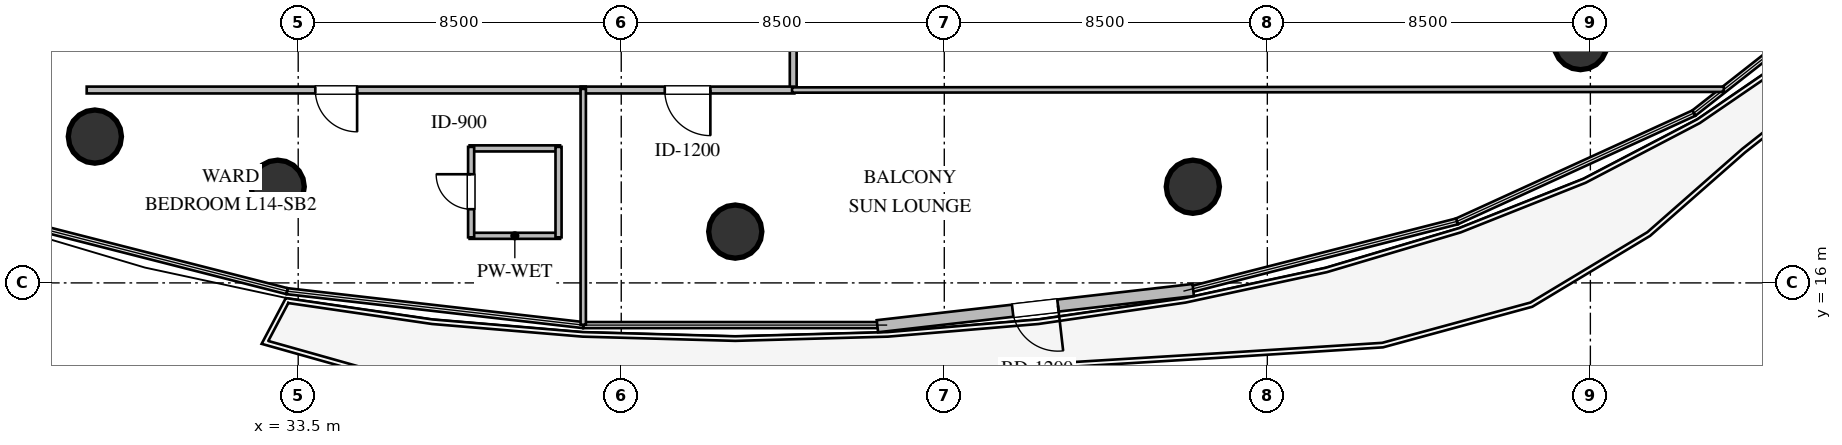
"""IFC4 building model, lengths in metres.
Left out: names, types, materials, properties, quantities, classifications, styles, units other than length and angle.
Written with IfcOpenShell. Run it as: python <this file> out.ifc"""

import sys

from ifc_helpers import new_model, si_unit, direction, frame, frame_2d, origin, origin_2d, place, context, subcontext, project, spatial, rectangle, circle, extrude, element, fill, save


model = new_model("IFC4")
c1 = context("Model", 3, precision=1e-05, world=origin(), true_north=direction((0.0, 1.0)))
c2 = subcontext(c1, "Body", "Model", "MODEL_VIEW")
j1 = project(units=[si_unit("LENGTHUNIT", "METRE"), si_unit("PLANEANGLEUNIT", "RADIAN")], contexts=[c1])
p1 = place(None, origin())
s1 = spatial("IfcSite", under=j1, at=p1, CompositionType="ELEMENT")
p2 = place(p1, origin())
s2 = spatial("IfcBuilding", under=s1, at=p2, CompositionType="ELEMENT")
p3 = place(p2, frame((0.0, 0.0, 56.4)))
s3 = spatial("IfcBuildingStorey", under=s2, at=p3, CompositionType="ELEMENT", Elevation=56.4)
for number, where, z_axis, x_axis in (
    (1, (28.15, 19.85, 0.0), (0.0, 0.0, 1.0), (1.0, 0.0, 0.0)),
    (2, (32.96, 18.53, 0.0), (0.0, 0.0, 1.0), (1.0, 0.0, 0.0)),
    (3, (45.0, 17.35, 0.0), (0.0, 0.0, 1.0), (1.0, 0.0, 0.0)),
    (4, (57.04, 18.53, 0.0), (0.0, 0.0, 1.0), (1.0, 0.0, 0.0)),
    (5, (67.24, 22.31, 0.0), (0.0, 0.0, 1.0), (1.0, 0.0, 0.0)),
):
    element("IfcColumn", number, at=place(p3, frame(where, z_axis=z_axis, x_axis=x_axis)), inside=s3, PredefinedType="COLUMN", context=c2, shape_type="SweptSolid", body=[
        extrude(circle(Radius=0.7, at=origin_2d()), origin(), (0.0, 0.0, 1.0), 3.6),
    ])
p4 = place(p3, frame((57.05, 15.812, 0.0), z_axis=(0.0, 0.0, 1.0), x_axis=(-0.993503192468, -0.113804246649, 0.0)))
e6 = element("IfcWall", 6, at=p4, inside=s3, PredefinedType="STANDARD", context=c2, shape_type="SweptSolid", body=[
    extrude(rectangle(XDim=8.365, YDim=0.32, at=frame_2d((4.182, 0.0))), origin(), (0.0, 0.0, 1.0), 3.36),
])
p5 = place(p4, frame((3.582, 0.0, 0.0)))
e7 = element("IfcOpeningElement", 7, at=p5, cuts=e6, PredefinedType="OPENING", context=c2, shape_type="SweptSolid", body=[
    extrude(rectangle(XDim=1.2, YDim=2.15, at=frame_2d((0.6, 1.075))), frame((0.0, 0.17, 0.0), z_axis=(0.0, -1.0, 0.0), x_axis=(1.0, 0.0, 0.0)), (0.0, 0.0, 1.0), 0.34),
])
p6 = place(p3, frame((38.01, 17.239, 0.0), z_axis=(0.0, 0.0, 1.0), x_axis=(1.0, 0.0, 0.0)))
e8 = element("IfcWall", 8, at=p6, inside=s3, PredefinedType="PLUMBINGWALL", context=c2, shape_type="SweptSolid", body=[
    extrude(rectangle(XDim=2.38, YDim=0.16, at=frame_2d((1.19, 0.0))), origin(), (0.0, 0.0, 1.0), 2.738),
])
p7 = place(p3, frame((38.01, 19.539, 0.0), z_axis=(0.0, 0.0, 1.0), x_axis=(1.0, 0.0, 0.0)))
e9 = element("IfcWall", 9, at=p7, inside=s3, PredefinedType="PLUMBINGWALL", context=c2, shape_type="SweptSolid", body=[
    extrude(rectangle(XDim=2.38, YDim=0.16, at=frame_2d((1.19, 0.0))), origin(), (0.0, 0.0, 1.0), 3.36),
])
p8 = place(p3, frame((38.05, 17.199, 0.0), z_axis=(0.0, 0.0, 1.0), x_axis=(0.0, 1.0, 0.0)))
e10 = element("IfcWall", 10, at=p8, inside=s3, PredefinedType="PLUMBINGWALL", context=c2, shape_type="SweptSolid", body=[
    extrude(rectangle(XDim=2.38, YDim=0.16, at=frame_2d((1.19, 0.0))), origin(), (0.0, 0.0, 1.0), 3.36),
])
p9 = place(p8, frame((0.74, 0.0, 0.0)))
e11 = element("IfcOpeningElement", 11, at=p9, cuts=e10, PredefinedType="OPENING", context=c2, shape_type="SweptSolid", body=[
    extrude(rectangle(XDim=0.92, YDim=2.1, at=frame_2d((0.46, 1.05))), frame((0.0, 0.09, 0.0), z_axis=(0.0, -1.0, 0.0), x_axis=(1.0, 0.0, 0.0)), (0.0, 0.0, 1.0), 0.18),
])
p10 = place(p3, frame((40.35, 17.199, 0.0), z_axis=(0.0, 0.0, 1.0), x_axis=(0.0, 1.0, 0.0)))
e12 = element("IfcWall", 12, at=p10, inside=s3, PredefinedType="PLUMBINGWALL", context=c2, shape_type="SweptSolid", body=[
    extrude(rectangle(XDim=2.38, YDim=0.16, at=frame_2d((1.19, 0.0))), origin(), (0.0, 0.0, 1.0), 3.36),
])
p11 = place(p3, frame((46.525, 24.605, 0.0), z_axis=(0.0, 0.0, 1.0), x_axis=(0.0, -1.0, 0.0)))
e13 = element("IfcWall", 13, at=p11, inside=s3, PredefinedType="PARTITIONING", context=c2, shape_type="SweptSolid", body=[
    extrude(rectangle(XDim=3.56, YDim=0.18, at=frame_2d((1.78, 0.0))), origin(), (0.0, 0.0, 1.0), 3.36),
])
p12 = place(p11, frame((1.18, 0.0, 0.0)))
e14 = element("IfcOpeningElement", 14, at=p12, cuts=e13, PredefinedType="OPENING", context=c2, shape_type="SweptSolid", body=[
    extrude(rectangle(XDim=1.2, YDim=2.15, at=frame_2d((0.6, 1.075))), frame((0.0, 0.1, 0.0), z_axis=(0.0, -1.0, 0.0), x_axis=(1.0, 0.0, 0.0)), (0.0, 0.0, 1.0), 0.2),
])
p13 = place(p3, frame((41.065, 21.075, 0.0), z_axis=(0.0, 0.0, 1.0), x_axis=(-1.0, 0.0, 0.0)))
e15 = element("IfcWall", 15, at=p13, inside=s3, PredefinedType="PARTITIONING", context=c2, shape_type="SweptSolid", body=[
    extrude(rectangle(XDim=13.13, YDim=0.18, at=frame_2d((6.565, 0.0))), origin(), (0.0, 0.0, 1.0), 2.996),
])
p14 = place(p13, frame((6.015, 0.0, 0.0)))
e16 = element("IfcOpeningElement", 16, at=p14, cuts=e15, PredefinedType="OPENING", context=c2, shape_type="SweptSolid", body=[
    extrude(rectangle(XDim=1.1, YDim=2.1, at=frame_2d((0.55, 1.05))), frame((0.0, 0.1, 0.0), z_axis=(0.0, -1.0, 0.0), x_axis=(1.0, 0.0, 0.0)), (0.0, 0.0, 1.0), 0.2),
])
p15 = place(p3, frame((46.555, 21.075, 0.0), z_axis=(0.0, 0.0, 1.0), x_axis=(-1.0, 0.0, 0.0)))
e17 = element("IfcWall", 17, at=p15, inside=s3, PredefinedType="PARTITIONING", context=c2, shape_type="SweptSolid", body=[
    extrude(rectangle(XDim=5.62, YDim=0.18, at=frame_2d((2.81, 0.0))), origin(), (0.0, 0.0, 1.0), 3.36),
])
p16 = place(p15, frame((2.21, 0.0, 0.0)))
e18 = element("IfcOpeningElement", 18, at=p16, cuts=e17, PredefinedType="OPENING", context=c2, shape_type="SweptSolid", body=[
    extrude(rectangle(XDim=1.2, YDim=2.15, at=frame_2d((0.6, 1.075))), frame((0.0, 0.1, 0.0), z_axis=(0.0, -1.0, 0.0), x_axis=(1.0, 0.0, 0.0)), (0.0, 0.0, 1.0), 0.2),
])
p17 = place(p3, frame((71.011, 21.094, 0.0), z_axis=(0.0, 0.0, 1.0), x_axis=(-0.999999682646, -0.000796685534, 0.0)))
e19 = element("IfcWall", 19, at=p17, inside=s3, PredefinedType="PARTITIONING", context=c2, shape_type="SweptSolid", body=[
    extrude(rectangle(XDim=24.516, YDim=0.14, at=frame_2d((12.258, 0.0))), origin(), (0.0, 0.0, 1.0), 2.996),
])
p18 = place(p3, frame((41.0, 21.105, 0.0), z_axis=(0.0, 0.0, 1.0), x_axis=(0.0, -1.0, 0.0)))
e20 = element("IfcWall", 20, at=p18, inside=s3, PredefinedType="PARTITIONING", context=c2, shape_type="SweptSolid", body=[
    extrude(rectangle(XDim=6.205, YDim=0.14, at=frame_2d((3.103, 0.0))), origin(), (0.0, 0.0, 1.0), 3.36),
])
p19 = place(p5, origin())
e21 = element("IfcDoor", 21, at=p19, inside=s3, OperationType="SINGLE_SWING_LEFT", PredefinedType="DOOR", context=c2, shape_type="SweptSolid", body=[
    extrude(rectangle(XDim=1.2, YDim=2.15, at=frame_2d((0.6, 1.075))), frame((0.0, 0.025, 0.0), z_axis=(0.0, -1.0, 0.0), x_axis=(1.0, 0.0, 0.0)), (0.0, 0.0, 1.0), 0.05),
])
fill(e7, e21)
p20 = place(p9, origin())
e22 = element("IfcDoor", 22, at=p20, inside=s3, OperationType="SINGLE_SWING_RIGHT", PredefinedType="DOOR", context=c2, shape_type="SweptSolid", body=[
    extrude(rectangle(XDim=0.92, YDim=2.1, at=frame_2d((0.46, 1.05))), frame((0.0, 0.025, 0.0), z_axis=(0.0, -1.0, 0.0), x_axis=(1.0, 0.0, 0.0)), (0.0, 0.0, 1.0), 0.05),
])
fill(e11, e22)
p21 = place(p14, origin())
e23 = element("IfcDoor", 23, at=p21, inside=s3, OperationType="SINGLE_SWING_LEFT", PredefinedType="DOOR", context=c2, shape_type="SweptSolid", body=[
    extrude(rectangle(XDim=1.1, YDim=2.1, at=frame_2d((0.55, 1.05))), frame((0.0, 0.025, 0.0), z_axis=(0.0, -1.0, 0.0), x_axis=(1.0, 0.0, 0.0)), (0.0, 0.0, 1.0), 0.05),
])
fill(e16, e23)
p22 = place(p16, origin())
e24 = element("IfcDoor", 24, at=p22, inside=s3, OperationType="SINGLE_SWING_LEFT", PredefinedType="DOOR", context=c2, shape_type="SweptSolid", body=[
    extrude(rectangle(XDim=1.2, YDim=2.15, at=frame_2d((0.6, 1.075))), frame((0.0, 0.025, 0.0), z_axis=(0.0, -1.0, 0.0), x_axis=(1.0, 0.0, 0.0)), (0.0, 0.0, 1.0), 0.05),
])
fill(e18, e24)
save(model, sys.argv[1])
